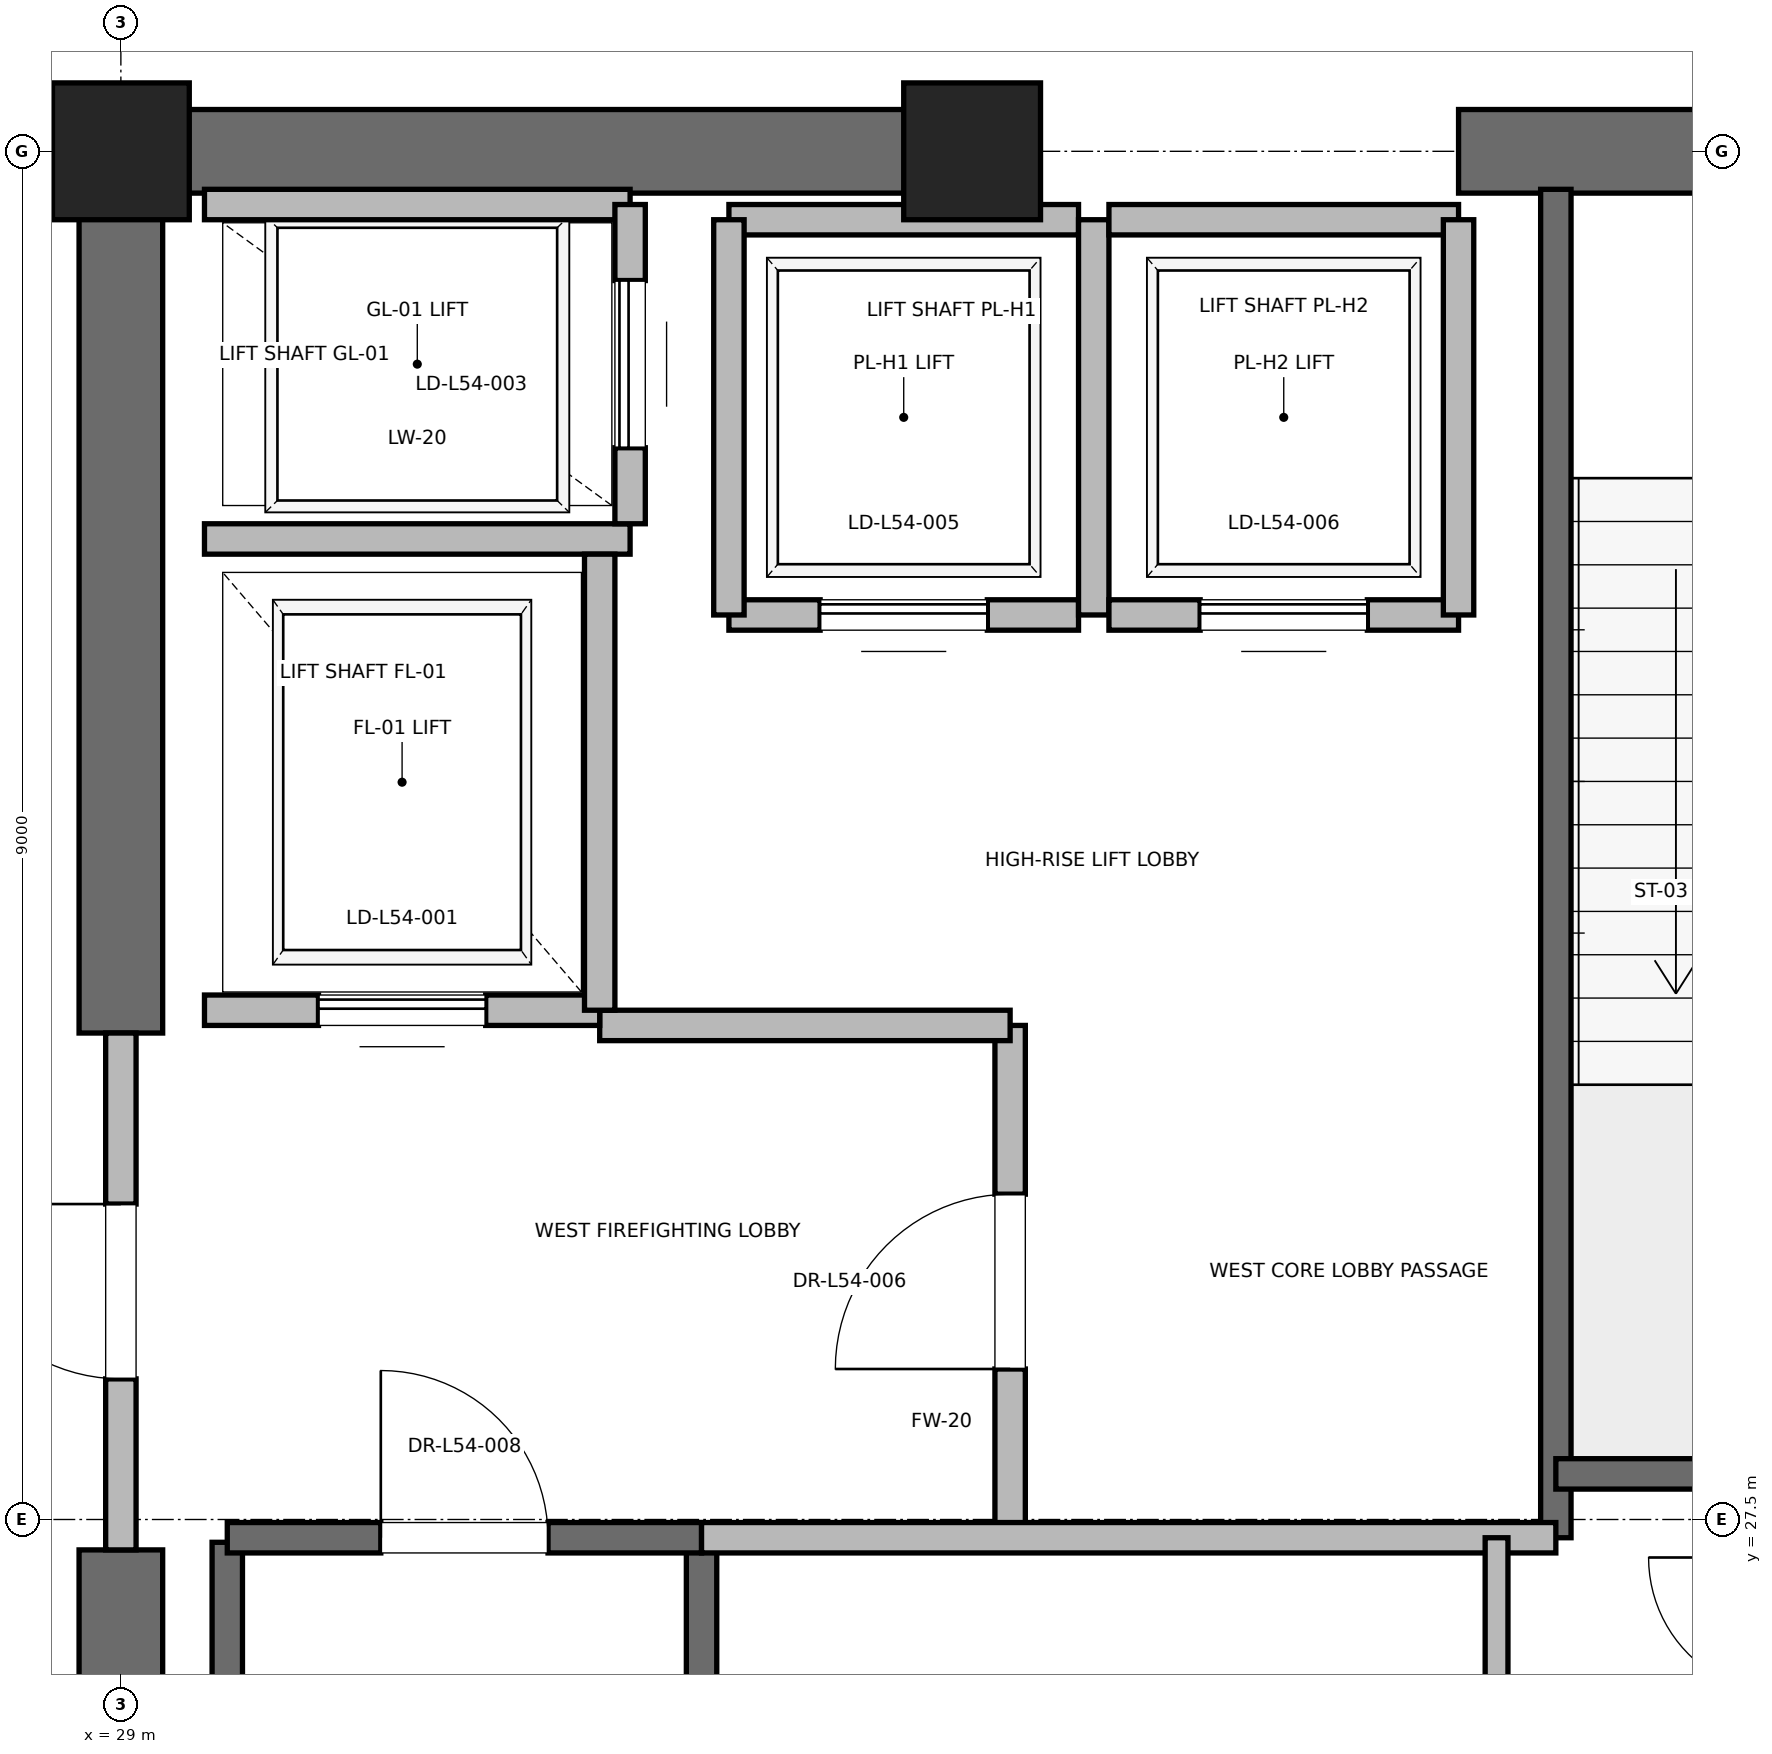
"""IFC4 building model, lengths in metres.
Left out: names, types, materials, properties, quantities, classifications, styles, units other than length and angle.
Written with IfcOpenShell. Run it as: python <this file> out.ifc"""

import sys

from ifc_helpers import new_model, si_unit, direction, frame, frame_2d, origin, origin_2d, place, context, subcontext, project, spatial, rectangle, extrude, element, fill, save


model = new_model("IFC4")
c1 = context("Model", 3, precision=1e-05, world=origin(), true_north=direction((0.0, 1.0)))
c2 = subcontext(c1, "Body", "Model", "MODEL_VIEW")
j1 = project(units=[si_unit("LENGTHUNIT", "METRE"), si_unit("PLANEANGLEUNIT", "RADIAN")], contexts=[c1])
p1 = place(None, origin())
s1 = spatial("IfcSite", under=j1, at=p1, CompositionType="ELEMENT")
p2 = place(p1, origin())
s2 = spatial("IfcBuilding", under=s1, at=p2, CompositionType="ELEMENT")
p3 = place(p2, frame((0.0, 0.0, 233.2)))
s3 = spatial("IfcBuildingStorey", under=s2, at=p3, CompositionType="ELEMENT", Elevation=233.2)
for number, where, z_axis, x_axis in (
    (1, (29.0, 36.5, 0.0), (0.0, 0.0, 1.0), (1.0, 0.0, 0.0)),
    (2, (34.6, 36.5, 0.0), (0.0, 0.0, 1.0), (1.0, 0.0, 0.0)),
):
    element("IfcColumn", number, at=place(p3, frame(where, z_axis=z_axis, x_axis=x_axis)), inside=s3, PredefinedType="PILASTER", context=c2, shape_type="SweptSolid", body=[
        extrude(rectangle(XDim=0.9, YDim=0.9, at=origin_2d()), origin(), (0.0, 0.0, 1.0), 5.0),
    ])
p4 = place(p3, frame((29.0, 36.5, 0.0), z_axis=(0.0, 0.0, 1.0), x_axis=(1.0, 0.0, 0.0)))
e3 = element("IfcWall", 3, at=p4, inside=s3, PredefinedType="SHEAR", context=c2, shape_type="SweptSolid", body=[
    extrude(rectangle(XDim=5.8, YDim=0.55, at=frame_2d((2.9, 0.0))), origin(), (0.0, 0.0, 1.0), 4.7),
])
p5 = place(p3, frame((37.8, 36.5, 0.0), z_axis=(0.0, 0.0, 1.0), x_axis=(1.0, 0.0, 0.0)))
e4 = element("IfcWall", 4, at=p5, inside=s3, PredefinedType="SHEAR", context=c2, shape_type="SweptSolid", body=[
    extrude(rectangle(XDim=4.4, YDim=0.55, at=frame_2d((2.2, 0.0))), origin(), (0.0, 0.0, 1.0), 4.7),
])
p6 = place(p5, frame((1.65, 0.0, 0.0)))
e5 = element("IfcOpeningElement", 5, at=p6, cuts=e4, PredefinedType="OPENING", context=c2, shape_type="SweptSolid", body=[
    extrude(rectangle(XDim=1.1, YDim=2.15, at=frame_2d((0.55, 1.075))), frame((0.0, 0.275, 0.0), z_axis=(0.0, -1.0, 0.0), x_axis=(1.0, 0.0, 0.0)), (0.0, 0.0, 1.0), 0.55),
])
p7 = place(p3, frame((29.0, 18.5, 0.0), z_axis=(0.0, 0.0, 1.0), x_axis=(0.0, 1.0, 0.0)))
e6 = element("IfcWall", 6, at=p7, inside=s3, PredefinedType="SHEAR", context=c2, shape_type="SweptSolid", body=[
    extrude(rectangle(XDim=8.8, YDim=0.55, at=frame_2d((4.4, 0.0))), origin(), (0.0, 0.0, 1.0), 4.7),
])
p8 = place(p3, frame((29.0, 30.7, 0.0), z_axis=(0.0, 0.0, 1.0), x_axis=(0.0, 1.0, 0.0)))
e7 = element("IfcWall", 7, at=p8, inside=s3, PredefinedType="SHEAR", context=c2, shape_type="SweptSolid", body=[
    extrude(rectangle(XDim=5.8, YDim=0.55, at=frame_2d((2.9, 0.0))), origin(), (0.0, 0.0, 1.0), 4.7),
])
p9 = place(p3, frame((29.7, 19.2, 0.0), z_axis=(0.0, 0.0, 1.0), x_axis=(0.0, 1.0, 0.0)))
e8 = element("IfcWall", 8, at=p9, inside=s3, PredefinedType="SOLIDWALL", context=c2, shape_type="SweptSolid", body=[
    extrude(rectangle(XDim=8.15, YDim=0.2, at=frame_2d((4.075, 0.0))), origin(), (0.0, 0.0, 1.0), 4.7),
])
p10 = place(p3, frame((32.82, 18.6, 0.0), z_axis=(0.0, 0.0, 1.0), x_axis=(0.0, 1.0, 0.0)))
e9 = element("IfcWall", 9, at=p10, inside=s3, PredefinedType="SOLIDWALL", context=c2, shape_type="SweptSolid", body=[
    extrude(rectangle(XDim=8.78, YDim=0.2, at=frame_2d((4.39, 0.0))), origin(), (0.0, 0.0, 1.0), 4.7),
])
p11 = place(p3, frame((29.7, 27.38, 0.0), z_axis=(0.0, 0.0, 1.0), x_axis=(1.0, 0.0, 0.0)))
e10 = element("IfcWall", 10, at=p11, inside=s3, PredefinedType="SOLIDWALL", context=c2, shape_type="SweptSolid", body=[
    extrude(rectangle(XDim=3.12, YDim=0.2, at=frame_2d((1.56, 0.0))), origin(), (0.0, 0.0, 1.0), 4.7),
])
p12 = place(p11, frame((1.01, 0.0, 0.0)))
e11 = element("IfcOpeningElement", 11, at=p12, cuts=e10, PredefinedType="OPENING", context=c2, shape_type="SweptSolid", body=[
    extrude(rectangle(XDim=1.1, YDim=2.15, at=frame_2d((0.55, 1.075))), frame((0.0, 0.1, 0.0), z_axis=(0.0, -1.0, 0.0), x_axis=(1.0, 0.0, 0.0)), (0.0, 0.0, 1.0), 0.2),
])
p13 = place(p3, frame((38.44, 27.38, 0.0), z_axis=(0.0, 0.0, 1.0), x_axis=(0.0, 1.0, 0.0)))
e12 = element("IfcWall", 12, at=p13, inside=s3, PredefinedType="SOLIDWALL", context=c2, shape_type="SweptSolid", body=[
    extrude(rectangle(XDim=8.87, YDim=0.2, at=frame_2d((4.435, 0.0))), origin(), (0.0, 0.0, 1.0), 4.7),
])
p14 = place(p3, frame((38.44, 27.8, 0.0), z_axis=(0.0, 0.0, 1.0), x_axis=(1.0, 0.0, 0.0)))
e13 = element("IfcWall", 13, at=p14, inside=s3, PredefinedType="SOLIDWALL", context=c2, shape_type="SweptSolid", body=[
    extrude(rectangle(XDim=3.32, YDim=0.2, at=frame_2d((1.66, 0.0))), origin(), (0.0, 0.0, 1.0), 4.7),
])
p15 = place(p3, frame((34.85, 27.38, 0.0), z_axis=(0.0, 0.0, 1.0), x_axis=(0.0, 1.0, 0.0)))
e14 = element("IfcWall", 14, at=p15, inside=s3, PredefinedType="PARTITIONING", context=c2, shape_type="SweptSolid", body=[
    extrude(rectangle(XDim=3.37, YDim=0.2, at=frame_2d((1.685, 0.0))), origin(), (0.0, 0.0, 1.0), 4.7),
])
p16 = place(p15, frame((1.11, 0.0, 0.0)))
e15 = element("IfcOpeningElement", 15, at=p16, cuts=e14, PredefinedType="OPENING", context=c2, shape_type="SweptSolid", body=[
    extrude(rectangle(XDim=1.15, YDim=2.2, at=frame_2d((0.575, 1.1))), frame((0.0, 0.1, 0.0), z_axis=(0.0, -1.0, 0.0), x_axis=(1.0, 0.0, 0.0)), (0.0, 0.0, 1.0), 0.2),
])
p17 = place(p3, frame((29.0, 27.3, 0.0), z_axis=(0.0, 0.0, 1.0), x_axis=(0.0, 1.0, 0.0)))
e16 = element("IfcWall", 16, at=p17, inside=s3, PredefinedType="PARTITIONING", context=c2, shape_type="SweptSolid", body=[
    extrude(rectangle(XDim=3.4, YDim=0.2, at=frame_2d((1.7, 0.0))), origin(), (0.0, 0.0, 1.0), 3.68),
])
p18 = place(p17, frame((1.125, 0.0, 0.0)))
e17 = element("IfcOpeningElement", 17, at=p18, cuts=e16, PredefinedType="OPENING", context=c2, shape_type="SweptSolid", body=[
    extrude(rectangle(XDim=1.15, YDim=2.2, at=frame_2d((0.575, 1.1))), frame((0.0, 0.1, 0.0), z_axis=(0.0, -1.0, 0.0), x_axis=(1.0, 0.0, 0.0)), (0.0, 0.0, 1.0), 0.2),
])
p19 = place(p3, frame((32.82, 27.38, 0.0), z_axis=(0.0, 0.0, 1.0), x_axis=(1.0, 0.0, 0.0)))
e18 = element("IfcWall", 18, at=p19, inside=s3, PredefinedType="PARTITIONING", context=c2, shape_type="SweptSolid", body=[
    extrude(rectangle(XDim=5.62, YDim=0.2, at=frame_2d((2.81, 0.0))), origin(), (0.0, 0.0, 1.0), 4.7),
])
p20 = place(p3, frame((32.15, 30.75, 0.0), z_axis=(0.0, 0.0, 1.0), x_axis=(1.0, 0.0, 0.0)))
e19 = element("IfcWall", 19, at=p20, inside=s3, PredefinedType="PARTITIONING", context=c2, shape_type="SweptSolid", body=[
    extrude(rectangle(XDim=2.7, YDim=0.2, at=frame_2d((1.35, 0.0))), origin(), (0.0, 0.0, 1.0), 4.7),
])
p21 = place(p3, frame((29.55, 30.85, 0.0), z_axis=(0.0, 0.0, 1.0), x_axis=(1.0, 0.0, 0.0)))
e20 = element("IfcWall", 20, at=p21, inside=s3, PredefinedType="SOLIDWALL", context=c2, shape_type="SweptSolid", body=[
    extrude(rectangle(XDim=2.6, YDim=0.2, at=frame_2d((1.3, 0.0))), origin(), (0.0, 0.0, 1.0), 3.68),
])
p22 = place(p21, frame((0.75, 0.0, 0.0)))
e21 = element("IfcOpeningElement", 21, at=p22, cuts=e20, PredefinedType="OPENING", context=c2, shape_type="SweptSolid", body=[
    extrude(rectangle(XDim=1.1, YDim=2.2, at=frame_2d((0.55, 1.1))), frame((0.0, 0.1, 0.0), z_axis=(0.0, -1.0, 0.0), x_axis=(1.0, 0.0, 0.0)), (0.0, 0.0, 1.0), 0.2),
])
p23 = place(p3, frame((29.55, 33.95, 0.0), z_axis=(0.0, 0.0, 1.0), x_axis=(1.0, 0.0, 0.0)))
e22 = element("IfcWall", 22, at=p23, inside=s3, PredefinedType="SOLIDWALL", context=c2, shape_type="SweptSolid", body=[
    extrude(rectangle(XDim=2.8, YDim=0.2, at=frame_2d((1.4, 0.0))), origin(), (0.0, 0.0, 1.0), 4.7),
])
p24 = place(p3, frame((32.15, 30.85, 0.0), z_axis=(0.0, 0.0, 1.0), x_axis=(0.0, 1.0, 0.0)))
e23 = element("IfcWall", 23, at=p24, inside=s3, PredefinedType="SOLIDWALL", context=c2, shape_type="SweptSolid", body=[
    extrude(rectangle(XDim=3.0, YDim=0.2, at=frame_2d((1.5, 0.0))), origin(), (0.0, 0.0, 1.0), 4.7),
])
p25 = place(p3, frame((32.35, 36.15, 0.0), z_axis=(0.0, 0.0, 1.0), x_axis=(-1.0, 0.0, 0.0)))
e24 = element("IfcWall", 24, at=p25, inside=s3, PredefinedType="SOLIDWALL", context=c2, shape_type="SweptSolid", body=[
    extrude(rectangle(XDim=2.8, YDim=0.2, at=frame_2d((1.4, 0.0))), origin(), (0.0, 0.0, 1.0), 3.987),
])
p26 = place(p3, frame((32.35, 34.05, 0.0), z_axis=(0.0, 0.0, 1.0), x_axis=(0.0, 1.0, 0.0)))
e25 = element("IfcWall", 25, at=p26, inside=s3, PredefinedType="SOLIDWALL", context=c2, shape_type="SweptSolid", body=[
    extrude(rectangle(XDim=2.1, YDim=0.2, at=frame_2d((1.05, 0.0))), origin(), (0.0, 0.0, 1.0), 4.7),
])
p27 = place(p26, frame((0.5, 0.0, 0.0)))
e26 = element("IfcOpeningElement", 26, at=p27, cuts=e25, PredefinedType="OPENING", context=c2, shape_type="SweptSolid", body=[
    extrude(rectangle(XDim=1.1, YDim=2.2, at=frame_2d((0.55, 1.1))), frame((0.0, 0.1, 0.0), z_axis=(0.0, -1.0, 0.0), x_axis=(1.0, 0.0, 0.0)), (0.0, 0.0, 1.0), 0.2),
])
p28 = place(p3, frame((33.0, 33.45, 0.0), z_axis=(0.0, 0.0, 1.0), x_axis=(1.0, 0.0, 0.0)))
e27 = element("IfcWall", 27, at=p28, inside=s3, PredefinedType="SOLIDWALL", context=c2, shape_type="SweptSolid", body=[
    extrude(rectangle(XDim=2.3, YDim=0.2, at=frame_2d((1.15, 0.0))), origin(), (0.0, 0.0, 1.0), 4.7),
])
p29 = place(p28, frame((0.6, 0.0, 0.0)))
e28 = element("IfcOpeningElement", 28, at=p29, cuts=e27, PredefinedType="OPENING", context=c2, shape_type="SweptSolid", body=[
    extrude(rectangle(XDim=1.1, YDim=2.2, at=frame_2d((0.55, 1.1))), frame((0.0, 0.1, 0.0), z_axis=(0.0, -1.0, 0.0), x_axis=(1.0, 0.0, 0.0)), (0.0, 0.0, 1.0), 0.2),
])
p30 = place(p3, frame((35.3, 36.05, 0.0), z_axis=(0.0, 0.0, 1.0), x_axis=(-1.0, 0.0, 0.0)))
e29 = element("IfcWall", 29, at=p30, inside=s3, PredefinedType="SOLIDWALL", context=c2, shape_type="SweptSolid", body=[
    extrude(rectangle(XDim=2.3, YDim=0.2, at=frame_2d((1.15, 0.0))), origin(), (0.0, 0.0, 1.0), 3.68),
])
p31 = place(p3, frame((33.0, 36.05, 0.0), z_axis=(0.0, 0.0, 1.0), x_axis=(0.0, -1.0, 0.0)))
e30 = element("IfcWall", 30, at=p31, inside=s3, PredefinedType="SOLIDWALL", context=c2, shape_type="SweptSolid", body=[
    extrude(rectangle(XDim=2.6, YDim=0.2, at=frame_2d((1.3, 0.0))), origin(), (0.0, 0.0, 1.0), 4.7),
])
p32 = place(p3, frame((35.4, 33.45, 0.0), z_axis=(0.0, 0.0, 1.0), x_axis=(0.0, 1.0, 0.0)))
e31 = element("IfcWall", 31, at=p32, inside=s3, PredefinedType="SOLIDWALL", context=c2, shape_type="SweptSolid", body=[
    extrude(rectangle(XDim=2.6, YDim=0.2, at=frame_2d((1.3, 0.0))), origin(), (0.0, 0.0, 1.0), 3.68),
])
p33 = place(p3, frame((35.5, 33.45, 0.0), z_axis=(0.0, 0.0, 1.0), x_axis=(1.0, 0.0, 0.0)))
e32 = element("IfcWall", 32, at=p33, inside=s3, PredefinedType="SOLIDWALL", context=c2, shape_type="SweptSolid", body=[
    extrude(rectangle(XDim=2.3, YDim=0.2, at=frame_2d((1.15, 0.0))), origin(), (0.0, 0.0, 1.0), 4.7),
])
p34 = place(p33, frame((0.6, 0.0, 0.0)))
e33 = element("IfcOpeningElement", 33, at=p34, cuts=e32, PredefinedType="OPENING", context=c2, shape_type="SweptSolid", body=[
    extrude(rectangle(XDim=1.1, YDim=2.2, at=frame_2d((0.55, 1.1))), frame((0.0, 0.1, 0.0), z_axis=(0.0, -1.0, 0.0), x_axis=(1.0, 0.0, 0.0)), (0.0, 0.0, 1.0), 0.2),
])
p35 = place(p3, frame((37.8, 36.05, 0.0), z_axis=(0.0, 0.0, 1.0), x_axis=(-1.0, 0.0, 0.0)))
e34 = element("IfcWall", 34, at=p35, inside=s3, PredefinedType="SOLIDWALL", context=c2, shape_type="SweptSolid", body=[
    extrude(rectangle(XDim=2.3, YDim=0.2, at=frame_2d((1.15, 0.0))), origin(), (0.0, 0.0, 1.0), 3.68),
])
p36 = place(p3, frame((37.8, 33.45, 0.0), z_axis=(0.0, 0.0, 1.0), x_axis=(0.0, 1.0, 0.0)))
e35 = element("IfcWall", 35, at=p36, inside=s3, PredefinedType="SOLIDWALL", context=c2, shape_type="SweptSolid", body=[
    extrude(rectangle(XDim=2.6, YDim=0.2, at=frame_2d((1.3, 0.0))), origin(), (0.0, 0.0, 1.0), 3.68),
])
p37 = place(p3, frame((38.05, 24.5, 0.0), z_axis=(0.0, 0.0, 1.0), x_axis=(0.0, 1.0, 0.0)))
e36 = element("IfcWall", 36, at=p37, inside=s3, PredefinedType="PARTITIONING", context=c2, shape_type="SweptSolid", body=[
    extrude(rectangle(XDim=2.88, YDim=0.15, at=frame_2d((1.44, 0.0))), origin(), (0.0, 0.0, 1.0), 2.85),
])
p38 = place(p37, frame((0.94, 0.0, 0.0)))
e37 = element("IfcOpeningElement", 37, at=p38, cuts=e36, PredefinedType="OPENING", context=c2, shape_type="SweptSolid", body=[
    extrude(rectangle(XDim=1.0, YDim=2.15, at=frame_2d((0.5, 1.075))), frame((0.0, 0.075, 0.0), z_axis=(0.0, -1.0, 0.0), x_axis=(1.0, 0.0, 0.0)), (0.0, 0.0, 1.0), 0.15),
])
p39 = place(p12, origin())
e38 = element("IfcDoor", 38, at=p39, inside=s3, OperationType="SINGLE_SWING_LEFT", PredefinedType="DOOR", context=c2, shape_type="SweptSolid", body=[
    extrude(rectangle(XDim=1.1, YDim=2.15, at=frame_2d((0.55, 1.075))), frame((0.0, 0.025, 0.0), z_axis=(0.0, -1.0, 0.0), x_axis=(1.0, 0.0, 0.0)), (0.0, 0.0, 1.0), 0.05),
])
fill(e11, e38)
p40 = place(p16, origin())
e39 = element("IfcDoor", 39, at=p40, inside=s3, OperationType="SINGLE_SWING_LEFT", PredefinedType="DOOR", context=c2, shape_type="SweptSolid", body=[
    extrude(rectangle(XDim=1.15, YDim=2.2, at=frame_2d((0.575, 1.1))), frame((0.0, 0.025, 0.0), z_axis=(0.0, -1.0, 0.0), x_axis=(1.0, 0.0, 0.0)), (0.0, 0.0, 1.0), 0.05),
])
fill(e15, e39)
p41 = place(p18, origin())
e40 = element("IfcDoor", 40, at=p41, inside=s3, OperationType="SINGLE_SWING_RIGHT", PredefinedType="DOOR", context=c2, shape_type="SweptSolid", body=[
    extrude(rectangle(XDim=1.15, YDim=2.2, at=frame_2d((0.575, 1.1))), frame((0.0, 0.025, 0.0), z_axis=(0.0, -1.0, 0.0), x_axis=(1.0, 0.0, 0.0)), (0.0, 0.0, 1.0), 0.05),
])
fill(e17, e40)
p42 = place(p22, origin())
e41 = element("IfcDoor", 41, at=p42, inside=s3, OperationType="SLIDING_TO_RIGHT", PredefinedType="DOOR", context=c2, shape_type="SweptSolid", body=[
    extrude(rectangle(XDim=1.1, YDim=2.2, at=frame_2d((0.55, 1.1))), frame((0.0, 0.025, 0.0), z_axis=(0.0, -1.0, 0.0), x_axis=(1.0, 0.0, 0.0)), (0.0, 0.0, 1.0), 0.05),
])
fill(e21, e41)
p43 = place(p27, origin())
e42 = element("IfcDoor", 42, at=p43, inside=s3, OperationType="SLIDING_TO_RIGHT", PredefinedType="DOOR", context=c2, shape_type="SweptSolid", body=[
    extrude(rectangle(XDim=1.1, YDim=2.2, at=frame_2d((0.55, 1.1))), frame((0.0, 0.025, 0.0), z_axis=(0.0, -1.0, 0.0), x_axis=(1.0, 0.0, 0.0)), (0.0, 0.0, 1.0), 0.05),
])
fill(e26, e42)
p44 = place(p29, origin())
e43 = element("IfcDoor", 43, at=p44, inside=s3, OperationType="SLIDING_TO_RIGHT", PredefinedType="DOOR", context=c2, shape_type="SweptSolid", body=[
    extrude(rectangle(XDim=1.1, YDim=2.2, at=frame_2d((0.55, 1.1))), frame((0.0, 0.025, 0.0), z_axis=(0.0, -1.0, 0.0), x_axis=(1.0, 0.0, 0.0)), (0.0, 0.0, 1.0), 0.05),
])
fill(e28, e43)
p45 = place(p34, origin())
e44 = element("IfcDoor", 44, at=p45, inside=s3, OperationType="SLIDING_TO_RIGHT", PredefinedType="DOOR", context=c2, shape_type="SweptSolid", body=[
    extrude(rectangle(XDim=1.1, YDim=2.2, at=frame_2d((0.55, 1.1))), frame((0.0, 0.025, 0.0), z_axis=(0.0, -1.0, 0.0), x_axis=(1.0, 0.0, 0.0)), (0.0, 0.0, 1.0), 0.05),
])
fill(e33, e44)
save(model, sys.argv[1])
